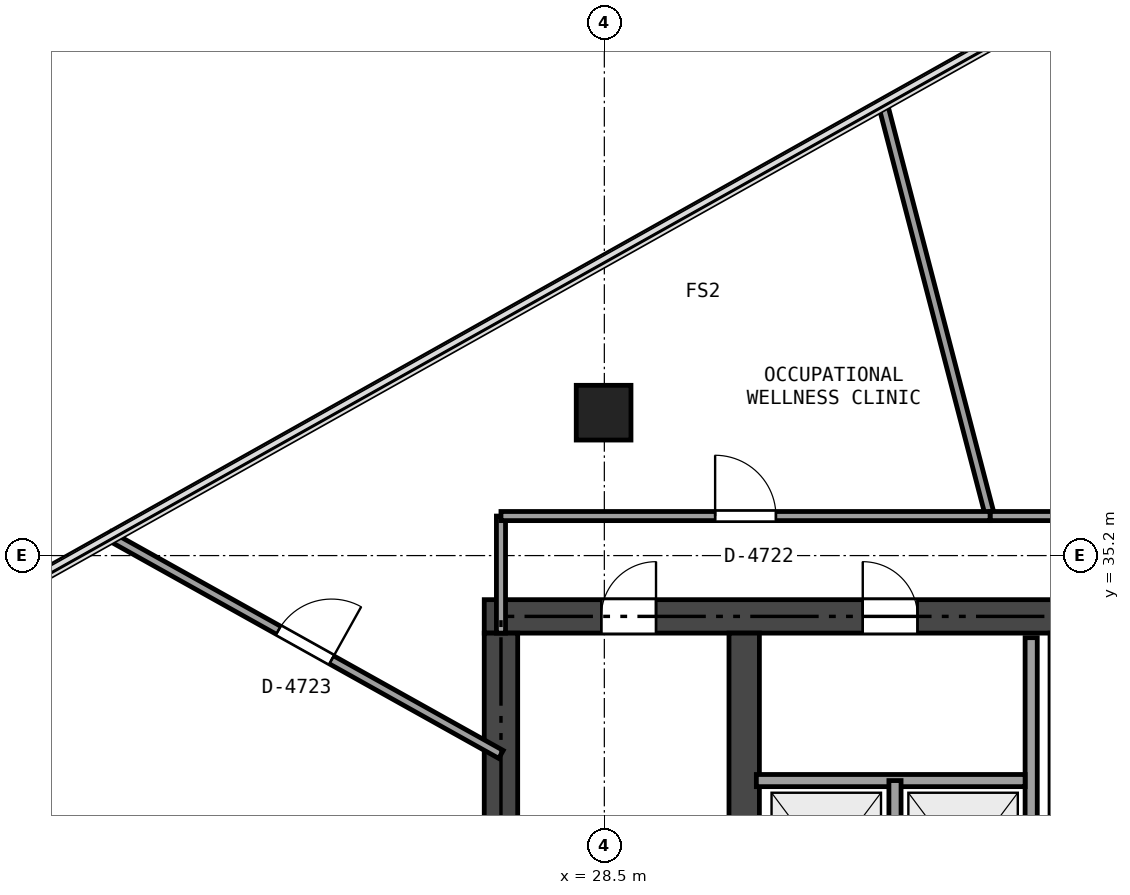
"""IFC4 building model, lengths in metres.
Left out: names, types, materials, properties, quantities, classifications, styles, units other than length and angle.
Written with IfcOpenShell. Run it as: python <this file> out.ifc"""

import sys

from ifc_helpers import new_model, si_unit, direction, frame, frame_2d, origin, origin_2d, place, context, subcontext, project, spatial, rectangle, extrude, element, fill, save


model = new_model("IFC4")
c1 = context("Model", 3, precision=1e-05, world=origin(), true_north=direction((0.0, 1.0)))
c2 = subcontext(c1, "Body", "Model", "MODEL_VIEW")
j1 = project(units=[si_unit("LENGTHUNIT", "METRE"), si_unit("PLANEANGLEUNIT", "RADIAN")], contexts=[c1])
p1 = place(None, origin())
s1 = spatial("IfcSite", under=j1, at=p1, CompositionType="ELEMENT")
p2 = place(p1, origin())
s2 = spatial("IfcBuilding", under=s1, at=p2, CompositionType="ELEMENT")
p3 = place(p2, frame((0.0, 0.0, 177.0)))
s3 = spatial("IfcBuildingStorey", under=s2, at=p3, CompositionType="ELEMENT", Elevation=177.0)
p4 = place(p3, frame((26.525, 34.2, 0.0), z_axis=(0.0, 0.0, 1.0), x_axis=(1.0, 0.0, 0.0)))
e1 = element("IfcWall", 1, at=p4, inside=s3, PredefinedType="SHEAR", context=c2, shape_type="SweptSolid", body=[
    extrude(rectangle(XDim=21.35, YDim=0.55, at=frame_2d((10.675, 0.0))), origin(), (0.0, 0.0, 1.0), 3.32),
])
p5 = place(p4, frame((9.675, 0.0, 0.0)))
e2 = element("IfcOpeningElement", 2, at=p5, cuts=e1, PredefinedType="OPENING", context=c2, shape_type="SweptSolid", body=[
    extrude(rectangle(XDim=1.1, YDim=2.15, at=frame_2d((0.55, 1.075))), frame((0.0, 0.285, 0.0), z_axis=(0.0, -1.0, 0.0), x_axis=(1.0, 0.0, 0.0)), (0.0, 0.0, 1.0), 0.57),
])
p6 = place(p4, frame((1.925, 0.0, 0.0)))
e3 = element("IfcOpeningElement", 3, at=p6, cuts=e1, PredefinedType="OPENING", context=c2, shape_type="SweptSolid", body=[
    extrude(rectangle(XDim=0.9, YDim=2.1, at=frame_2d((0.45, 1.05))), frame((0.0, 0.285, 0.0), z_axis=(0.0, -1.0, 0.0), x_axis=(1.0, 0.0, 0.0)), (0.0, 0.0, 1.0), 0.57),
])
p7 = place(p4, frame((6.225, 0.0, 0.0)))
e4 = element("IfcOpeningElement", 4, at=p7, cuts=e1, PredefinedType="OPENING", context=c2, shape_type="SweptSolid", body=[
    extrude(rectangle(XDim=0.9, YDim=2.1, at=frame_2d((0.45, 1.05))), frame((0.0, 0.285, 0.0), z_axis=(0.0, -1.0, 0.0), x_axis=(1.0, 0.0, 0.0)), (0.0, 0.0, 1.0), 0.57),
])
p8 = place(p3, frame((26.8, 18.875, 0.0), z_axis=(0.0, 0.0, 1.0), x_axis=(0.0, 1.0, 0.0)))
e5 = element("IfcWall", 5, at=p8, inside=s3, PredefinedType="SHEAR", context=c2, shape_type="SweptSolid", body=[
    extrude(rectangle(XDim=15.05, YDim=0.55, at=frame_2d((7.525, 0.0))), origin(), (0.0, 0.0, 1.0), 3.32),
])
p9 = place(p3, frame((30.8, 18.875, 0.0), z_axis=(0.0, 0.0, 1.0), x_axis=(0.0, 1.0, 0.0)))
e6 = element("IfcWall", 6, at=p9, inside=s3, PredefinedType="SHEAR", context=c2, shape_type="SweptSolid", body=[
    extrude(rectangle(XDim=15.05, YDim=0.5, at=frame_2d((7.525, 0.0))), origin(), (0.0, 0.0, 1.0), 3.32),
])
p10 = place(p9, frame((6.625, 0.0, 0.0)))
e7 = element("IfcOpeningElement", 7, at=p10, cuts=e6, PredefinedType="OPENING", context=c2, shape_type="SweptSolid", body=[
    extrude(rectangle(XDim=1.1, YDim=2.15, at=frame_2d((0.55, 1.075))), frame((0.0, 0.26, 0.0), z_axis=(0.0, -1.0, 0.0), x_axis=(1.0, 0.0, 0.0)), (0.0, 0.0, 1.0), 0.52),
])
p11 = place(p9, frame((8.425, 0.0, 0.0)))
e8 = element("IfcOpeningElement", 8, at=p11, cuts=e6, PredefinedType="OPENING", context=c2, shape_type="SweptSolid", body=[
    extrude(rectangle(XDim=0.9, YDim=2.1, at=frame_2d((0.45, 1.05))), frame((0.0, 0.26, 0.0), z_axis=(0.0, -1.0, 0.0), x_axis=(1.0, 0.0, 0.0)), (0.0, 0.0, 1.0), 0.52),
])
p12 = place(p3, frame((35.94, 30.75, 0.0), z_axis=(0.0, 0.0, 1.0), x_axis=(0.0, 1.0, 0.0)))
e9 = element("IfcWall", 9, at=p12, inside=s3, PredefinedType="SHEAR", context=c2, shape_type="SweptSolid", body=[
    extrude(rectangle(XDim=3.175, YDim=0.22, at=frame_2d((1.587, 0.0))), origin(), (0.0, 0.0, 1.0), 3.32),
])
p13 = place(p3, frame((28.488, 37.55, -0.405), z_axis=(0.0, 0.0, 1.0), x_axis=(1.0, 0.0, 0.0)))
e10 = element("IfcColumn", 10, at=p13, inside=s3, PredefinedType="COLUMN", context=c2, shape_type="SweptSolid", body=[
    extrude(rectangle(XDim=0.9, YDim=0.9, at=origin_2d()), origin(), (0.0, 0.0, 1.0), 3.725),
])
p14 = place(p3, frame((35.52, 18.95, 0.0), z_axis=(0.0, 0.0, 1.0), x_axis=(0.0, 1.0, 0.0)))
e11 = element("IfcWall", 11, at=p14, inside=s3, PredefinedType="SOLIDWALL", context=c2, shape_type="SweptSolid", body=[
    extrude(rectangle(XDim=14.9, YDim=0.2, at=frame_2d((7.45, 0.0))), origin(), (0.0, 0.0, 1.0), 2.841),
])
p15 = place(p14, frame((7.755, 0.0, 0.0)))
e12 = element("IfcOpeningElement", 12, at=p15, cuts=e11, PredefinedType="OPENING", context=c2, shape_type="SweptSolid", body=[
    extrude(rectangle(XDim=0.95, YDim=2.15, at=frame_2d((0.475, 1.075))), frame((0.0, 0.11, 0.0), z_axis=(0.0, -1.0, 0.0), x_axis=(1.0, 0.0, 0.0)), (0.0, 0.0, 1.0), 0.22),
])
p16 = place(p14, frame((0.6, 0.0, 0.0)))
e13 = element("IfcOpeningElement", 13, at=p16, cuts=e11, PredefinedType="OPENING", context=c2, shape_type="SweptSolid", body=[
    extrude(rectangle(XDim=0.9, YDim=2.1, at=frame_2d((0.45, 1.05))), frame((0.0, 0.11, 0.0), z_axis=(0.0, -1.0, 0.0), x_axis=(1.0, 0.0, 0.0)), (0.0, 0.0, 1.0), 0.22),
])
p17 = place(p3, frame((31.0, 31.5, 0.0), z_axis=(0.0, 0.0, 1.0), x_axis=(1.0, 0.0, 0.0)))
e14 = element("IfcWall", 14, at=p17, inside=s3, PredefinedType="SOLIDWALL", context=c2, shape_type="SweptSolid", body=[
    extrude(rectangle(XDim=4.42, YDim=0.2, at=frame_2d((2.21, 0.0))), origin(), (0.0, 0.0, 1.0), 3.32),
])
p18 = place(p3, frame((33.28, 28.68, 0.0), z_axis=(0.0, 0.0, 1.0), x_axis=(0.0, 1.0, 0.0)))
e15 = element("IfcWall", 15, at=p18, inside=s3, PredefinedType="SOLIDWALL", context=c2, shape_type="SweptSolid", body=[
    extrude(rectangle(XDim=2.82, YDim=0.2, at=frame_2d((1.41, 0.0))), origin(), (0.0, 0.0, 1.0), 3.32),
])
p19 = place(p3, frame((33.074, 42.648, 0.0), z_axis=(0.0, 0.0, 1.0), x_axis=(0.251977614861, -0.967733063199, 0.0)))
e16 = element("IfcWall", 16, at=p19, inside=s3, PredefinedType="PARTITIONING", context=c2, shape_type="SweptSolid", body=[
    extrude(rectangle(XDim=7.024, YDim=0.15, at=frame_2d((3.512, 0.0))), origin(), (0.0, 0.0, 1.0), 2.905),
])
p20 = place(p3, frame((34.844, 35.85, 0.0), z_axis=(0.0, 0.0, 1.0), x_axis=(1.0, 0.0, 0.0)))
e17 = element("IfcWall", 17, at=p20, inside=s3, PredefinedType="PARTITIONING", context=c2, shape_type="SweptSolid", body=[
    extrude(rectangle(XDim=3.286, YDim=0.15, at=frame_2d((1.643, 0.0))), origin(), (0.0, 0.0, 1.0), 2.697),
])
p21 = place(p20, frame((1.143, 0.0, 0.0)))
e18 = element("IfcOpeningElement", 18, at=p21, cuts=e17, PredefinedType="OPENING", context=c2, shape_type="SweptSolid", body=[
    extrude(rectangle(XDim=1.0, YDim=2.15, at=frame_2d((0.5, 1.075))), frame((0.0, 0.085, 0.0), z_axis=(0.0, -1.0, 0.0), x_axis=(1.0, 0.0, 0.0)), (0.0, 0.0, 1.0), 0.17),
])
p22 = place(p3, frame((20.355, 35.527, 0.0), z_axis=(0.0, 0.0, 1.0), x_axis=(0.87320228503, -0.487357947938, 0.0)))
e19 = element("IfcWall", 19, at=p22, inside=s3, PredefinedType="PARTITIONING", context=c2, shape_type="SweptSolid", body=[
    extrude(rectangle(XDim=7.381, YDim=0.15, at=frame_2d((3.69, 0.0))), origin(), (0.0, 0.0, 1.0), 2.905),
])
p23 = place(p22, frame((3.19, 0.0, 0.0)))
e20 = element("IfcOpeningElement", 20, at=p23, cuts=e19, PredefinedType="OPENING", context=c2, shape_type="SweptSolid", body=[
    extrude(rectangle(XDim=1.0, YDim=2.15, at=frame_2d((0.5, 1.075))), frame((0.0, 0.085, 0.0), z_axis=(0.0, -1.0, 0.0), x_axis=(1.0, 0.0, 0.0)), (0.0, 0.0, 1.0), 0.17),
])
p24 = place(p3, frame((26.8, 33.925, 0.0), z_axis=(0.0, 0.0, 1.0), x_axis=(0.0, 1.0, 0.0)))
e21 = element("IfcWall", 21, at=p24, inside=s3, PredefinedType="PARTITIONING", context=c2, shape_type="SweptSolid", body=[
    extrude(rectangle(XDim=1.925, YDim=0.15, at=frame_2d((0.962, 0.0))), origin(), (0.0, 0.0, 1.0), 2.905),
])
p25 = place(p3, frame((26.8, 35.85, 0.0), z_axis=(0.0, 0.0, 1.0), x_axis=(1.0, 0.0, 0.0)))
e22 = element("IfcWall", 22, at=p25, inside=s3, PredefinedType="PARTITIONING", context=c2, shape_type="SweptSolid", body=[
    extrude(rectangle(XDim=8.044, YDim=0.15, at=frame_2d((4.022, 0.0))), origin(), (0.0, 0.0, 1.0), 2.697),
])
p26 = place(p25, frame((3.522, 0.0, 0.0)))
e23 = element("IfcOpeningElement", 23, at=p26, cuts=e22, PredefinedType="OPENING", context=c2, shape_type="SweptSolid", body=[
    extrude(rectangle(XDim=1.0, YDim=2.15, at=frame_2d((0.5, 1.075))), frame((0.0, 0.085, 0.0), z_axis=(0.0, -1.0, 0.0), x_axis=(1.0, 0.0, 0.0)), (0.0, 0.0, 1.0), 0.17),
])
p27 = place(p6, origin())
e24 = element("IfcDoor", 24, at=p27, inside=s3, OperationType="SINGLE_SWING_RIGHT", PredefinedType="DOOR", context=c2, shape_type="SweptSolid", body=[
    extrude(rectangle(XDim=0.9, YDim=2.1, at=frame_2d((0.45, 1.05))), frame((0.0, 0.025, 0.0), z_axis=(0.0, -1.0, 0.0), x_axis=(1.0, 0.0, 0.0)), (0.0, 0.0, 1.0), 0.05),
])
fill(e3, e24)
p28 = place(p7, origin())
e25 = element("IfcDoor", 25, at=p28, inside=s3, OperationType="SINGLE_SWING_LEFT", PredefinedType="DOOR", context=c2, shape_type="SweptSolid", body=[
    extrude(rectangle(XDim=0.9, YDim=2.1, at=frame_2d((0.45, 1.05))), frame((0.0, 0.025, 0.0), z_axis=(0.0, -1.0, 0.0), x_axis=(1.0, 0.0, 0.0)), (0.0, 0.0, 1.0), 0.05),
])
fill(e4, e25)
p29 = place(p26, origin())
e26 = element("IfcDoor", 26, at=p29, inside=s3, OperationType="SINGLE_SWING_LEFT", PredefinedType="DOOR", context=c2, shape_type="SweptSolid", body=[
    extrude(rectangle(XDim=1.0, YDim=2.15, at=frame_2d((0.5, 1.075))), frame((0.0, 0.025, 0.0), z_axis=(0.0, -1.0, 0.0), x_axis=(1.0, 0.0, 0.0)), (0.0, 0.0, 1.0), 0.05),
])
fill(e23, e26)
p30 = place(p23, origin())
e27 = element("IfcDoor", 27, at=p30, inside=s3, OperationType="SINGLE_SWING_RIGHT", PredefinedType="DOOR", context=c2, shape_type="SweptSolid", body=[
    extrude(rectangle(XDim=1.0, YDim=2.15, at=frame_2d((0.5, 1.075))), frame((0.0, 0.025, 0.0), z_axis=(0.0, -1.0, 0.0), x_axis=(1.0, 0.0, 0.0)), (0.0, 0.0, 1.0), 0.05),
])
fill(e20, e27)
save(model, sys.argv[1])
